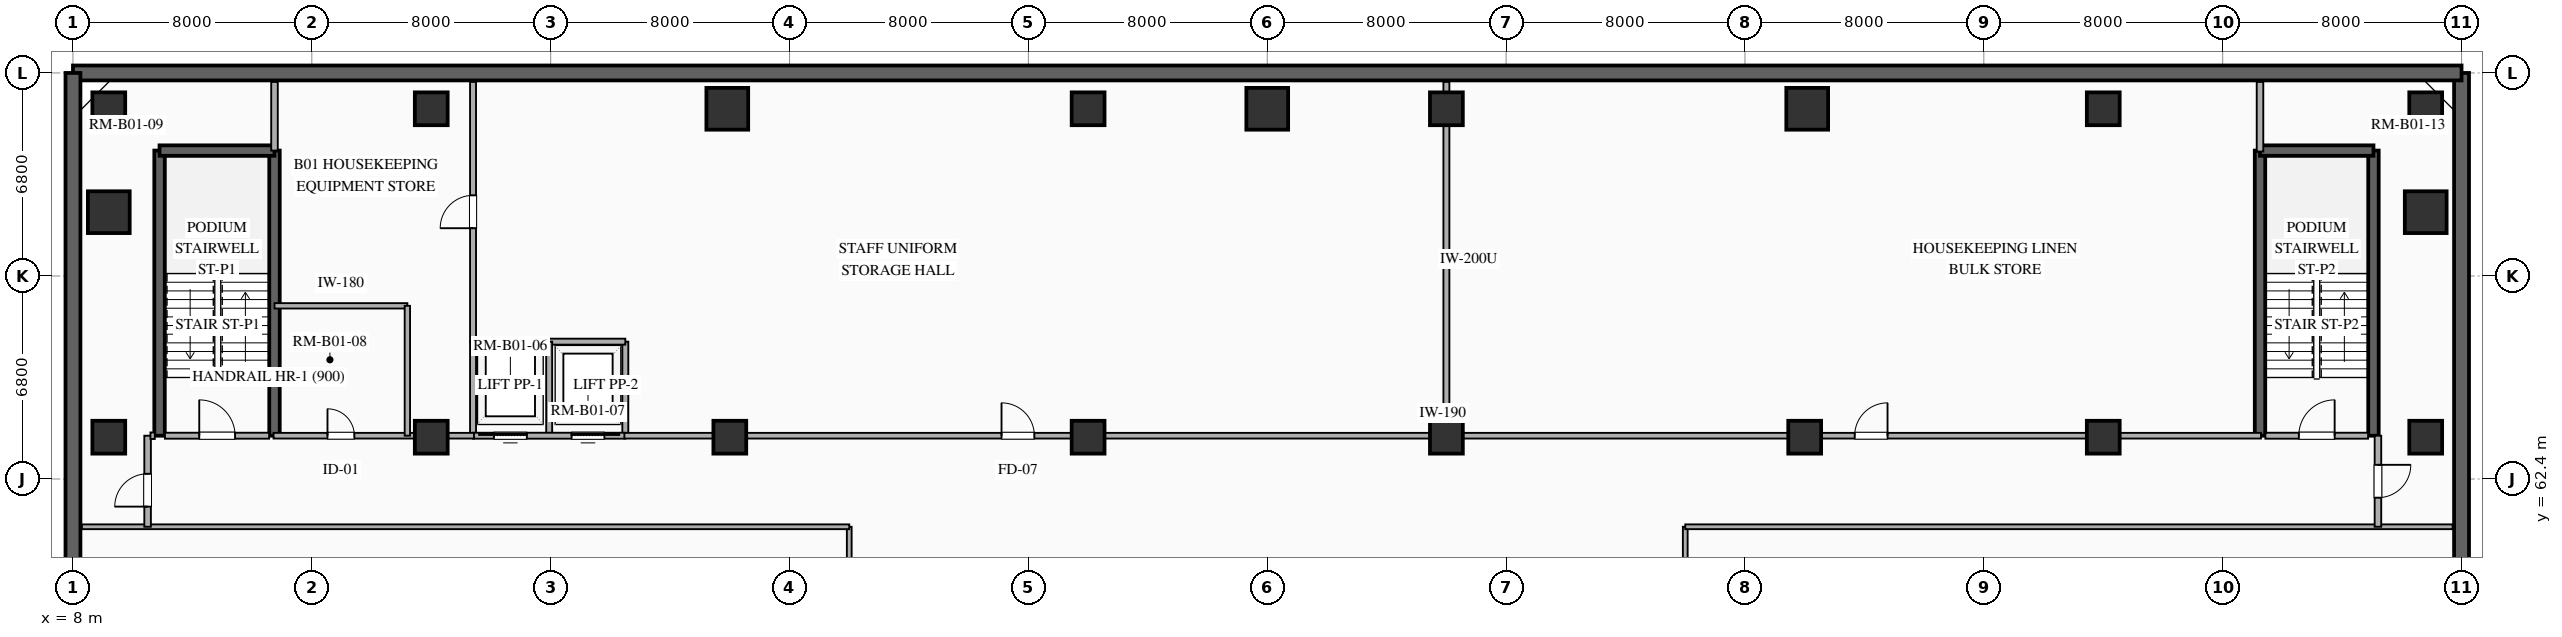
"""IFC4 building model, lengths in metres.
Left out: names, types, materials, properties, quantities, classifications, styles, units other than length and angle.
Written with IfcOpenShell. Run it as: python <this file> out.ifc"""

import sys

from ifc_helpers import new_model, si_unit, direction, frame, frame_2d, origin, origin_2d, place, context, subcontext, project, spatial, rectangle, extrude, element, fill, save


model = new_model("IFC4")
c1 = context("Model", 3, precision=1e-05, world=origin(), true_north=direction((0.0, 1.0)))
c2 = subcontext(c1, "Body", "Model", "MODEL_VIEW")
j1 = project(units=[si_unit("LENGTHUNIT", "METRE"), si_unit("PLANEANGLEUNIT", "RADIAN")], contexts=[c1])
p1 = place(None, origin())
s1 = spatial("IfcSite", under=j1, at=p1, CompositionType="ELEMENT")
p2 = place(p1, origin())
s2 = spatial("IfcBuilding", under=s1, at=p2, CompositionType="ELEMENT")
p3 = place(p2, frame((0.0, 0.0, -4.5)))
s3 = spatial("IfcBuildingStorey", under=s2, at=p3, CompositionType="ELEMENT", Elevation=-4.5)
p4 = place(p3, frame((88.0, 8.0, 0.0), z_axis=(0.0, 0.0, 1.0), x_axis=(0.0, 1.0, 0.0)))
e1 = element("IfcWall", 1, at=p4, inside=s3, PredefinedType="SOLIDWALL", context=c2, shape_type="SweptSolid", body=[
    extrude(rectangle(XDim=68.0, YDim=0.5, at=frame_2d((34.0, 0.0))), origin(), (0.0, 0.0, 1.0), 4.22),
])
p5 = place(p3, frame((88.0, 76.0, 0.0), z_axis=(0.0, 0.0, 1.0), x_axis=(-1.0, 0.0, 0.0)))
e2 = element("IfcWall", 2, at=p5, inside=s3, PredefinedType="SOLIDWALL", context=c2, shape_type="SweptSolid", body=[
    extrude(rectangle(XDim=80.0, YDim=0.5, at=frame_2d((40.0, 0.0))), origin(), (0.0, 0.0, 1.0), 4.22),
])
p6 = place(p3, frame((8.0, 76.0, 0.0), z_axis=(0.0, 0.0, 1.0), x_axis=(0.0, -1.0, 0.0)))
e3 = element("IfcWall", 3, at=p6, inside=s3, PredefinedType="SOLIDWALL", context=c2, shape_type="SweptSolid", body=[
    extrude(rectangle(XDim=68.0, YDim=0.5, at=frame_2d((34.0, 0.0))), origin(), (0.0, 0.0, 1.0), 4.22),
])
for number, where, z_axis, x_axis in (
    (4, (9.2, 74.8, 0.0), (0.0, 0.0, 1.0), (1.0, 0.0, 0.0)),
    (5, (9.2, 63.8, 0.0), (0.0, 0.0, 1.0), (1.0, 0.0, 0.0)),
    (6, (20.0, 74.8, 0.0), (0.0, 0.0, 1.0), (1.0, 0.0, 0.0)),
    (7, (20.0, 63.8, 0.0), (0.0, 0.0, 1.0), (1.0, 0.0, 0.0)),
    (8, (30.0, 63.8, 0.0), (0.0, 0.0, 1.0), (1.0, 0.0, 0.0)),
    (9, (42.0, 74.8, 0.0), (0.0, 0.0, 1.0), (1.0, 0.0, 0.0)),
    (10, (42.0, 63.8, 0.0), (0.0, 0.0, 1.0), (1.0, 0.0, 0.0)),
    (11, (54.0, 74.8, 0.0), (0.0, 0.0, 1.0), (1.0, 0.0, 0.0)),
    (12, (54.0, 63.8, 0.0), (0.0, 0.0, 1.0), (1.0, 0.0, 0.0)),
    (13, (66.0, 63.8, 0.0), (0.0, 0.0, 1.0), (1.0, 0.0, 0.0)),
    (14, (76.0, 74.8, 0.0), (0.0, 0.0, 1.0), (1.0, 0.0, 0.0)),
    (15, (76.0, 63.8, 0.0), (0.0, 0.0, 1.0), (1.0, 0.0, 0.0)),
    (16, (86.8, 74.8, 0.0), (0.0, 0.0, 1.0), (1.0, 0.0, 0.0)),
    (17, (86.8, 63.8, 0.0), (0.0, 0.0, 1.0), (1.0, 0.0, 0.0)),
):
    element("IfcColumn", number, at=place(p3, frame(where, z_axis=z_axis, x_axis=x_axis)), inside=s3, PredefinedType="COLUMN", context=c2, shape_type="SweptSolid", body=[
        extrude(rectangle(XDim=1.1, YDim=1.1, at=origin_2d()), origin(), (0.0, 0.0, 1.0), 4.22),
    ])
for number, where, z_axis, x_axis in (
    (18, (86.8, 71.337, 0.0), (0.0, 0.0, 1.0), (1.0, 0.0, 0.0)),
    (19, (66.084, 74.8, 0.0), (0.0, 0.0, 1.0), (1.0, 0.0, 0.0)),
    (20, (48.0, 74.8, 0.0), (0.0, 0.0, 1.0), (1.0, 0.0, 0.0)),
    (21, (29.916, 74.8, 0.0), (0.0, 0.0, 1.0), (1.0, 0.0, 0.0)),
    (22, (9.2, 71.337, 0.0), (0.0, 0.0, 1.0), (1.0, 0.0, 0.0)),
):
    element("IfcColumn", number, at=place(p3, frame(where, z_axis=z_axis, x_axis=x_axis)), inside=s3, PredefinedType="COLUMN", context=c2, shape_type="SweptSolid", body=[
        extrude(rectangle(XDim=1.4, YDim=1.4, at=origin_2d()), origin(), (0.0, 0.0, 1.0), 4.22),
    ])
for number, where, z_axis, x_axis in (
    (23, (10.9, 63.85, 0.0), (0.0, 0.0, 1.0), (0.0, 1.0, 0.0)),
    (24, (14.75, 63.85, 0.0), (0.0, 0.0, 1.0), (0.0, 1.0, 0.0)),
):
    element("IfcWall", number, at=place(p3, frame(where, z_axis=z_axis, x_axis=x_axis)), inside=s3, PredefinedType="SHEAR", context=c2, shape_type="SweptSolid", body=[
        extrude(rectangle(XDim=9.55, YDim=0.35, at=frame_2d((4.775, 0.0))), origin(), (0.0, 0.0, 1.0), 4.22),
    ])
p7 = place(p3, frame((10.9, 73.4, 0.0), z_axis=(0.0, 0.0, 1.0), x_axis=(1.0, 0.0, 0.0)))
e25 = element("IfcWall", 25, at=p7, inside=s3, PredefinedType="SHEAR", context=c2, shape_type="SweptSolid", body=[
    extrude(rectangle(XDim=3.85, YDim=0.35, at=frame_2d((1.925, 0.0))), origin(), (0.0, 0.0, 1.0), 4.22),
])
for number, where, z_axis, x_axis in (
    (26, (81.25, 63.85, 0.0), (0.0, 0.0, 1.0), (0.0, 1.0, 0.0)),
    (27, (85.05, 63.85, 0.0), (0.0, 0.0, 1.0), (0.0, 1.0, 0.0)),
):
    element("IfcWall", number, at=place(p3, frame(where, z_axis=z_axis, x_axis=x_axis)), inside=s3, PredefinedType="SHEAR", context=c2, shape_type="SweptSolid", body=[
        extrude(rectangle(XDim=9.55, YDim=0.35, at=frame_2d((4.775, 0.0))), origin(), (0.0, 0.0, 1.0), 4.22),
    ])
p8 = place(p3, frame((81.25, 73.4, 0.0), z_axis=(0.0, 0.0, 1.0), x_axis=(1.0, 0.0, 0.0)))
e28 = element("IfcWall", 28, at=p8, inside=s3, PredefinedType="SHEAR", context=c2, shape_type="SweptSolid", body=[
    extrude(rectangle(XDim=3.8, YDim=0.35, at=frame_2d((1.9, 0.0))), origin(), (0.0, 0.0, 1.0), 4.22),
])
p9 = place(p3, frame((11.08, 63.85, 0.0), z_axis=(0.0, 0.0, 1.0), x_axis=(1.0, 0.0, 0.0)))
e29 = element("IfcWall", 29, at=p9, inside=s3, PredefinedType="SOLIDWALL", context=c2, shape_type="SweptSolid", body=[
    extrude(rectangle(XDim=3.49, YDim=0.2, at=frame_2d((1.745, 0.0))), origin(), (0.0, 0.0, 1.0), 3.42),
])
p10 = place(p9, frame((1.15, 0.0, 0.0)))
e30 = element("IfcOpeningElement", 30, at=p10, cuts=e29, PredefinedType="OPENING", context=c2, shape_type="SweptSolid", body=[
    extrude(rectangle(XDim=1.2, YDim=2.15, at=frame_2d((0.6, 1.075))), frame((0.0, 0.11, 0.0), z_axis=(0.0, -1.0, 0.0), x_axis=(1.0, 0.0, 0.0)), (0.0, 0.0, 1.0), 0.22),
])
p11 = place(p3, frame((81.43, 63.85, 0.0), z_axis=(0.0, 0.0, 1.0), x_axis=(1.0, 0.0, 0.0)))
e31 = element("IfcWall", 31, at=p11, inside=s3, PredefinedType="SOLIDWALL", context=c2, shape_type="SweptSolid", body=[
    extrude(rectangle(XDim=3.44, YDim=0.2, at=frame_2d((1.72, 0.0))), origin(), (0.0, 0.0, 1.0), 3.42),
])
p12 = place(p11, frame((1.12, 0.0, 0.0)))
e32 = element("IfcOpeningElement", 32, at=p12, cuts=e31, PredefinedType="OPENING", context=c2, shape_type="SweptSolid", body=[
    extrude(rectangle(XDim=1.2, YDim=2.15, at=frame_2d((0.6, 1.075))), frame((0.0, 0.11, 0.0), z_axis=(0.0, -1.0, 0.0), x_axis=(1.0, 0.0, 0.0)), (0.0, 0.0, 1.0), 0.22),
])
for number, where, z_axis, x_axis in (
    (33, (21.4, 63.85, 0.0), (0.0, 0.0, 1.0), (0.0, 1.0, 0.0)),
    (34, (26.5, 63.85, 0.0), (0.0, 0.0, 1.0), (0.0, 1.0, 0.0)),
):
    element("IfcWall", number, at=place(p3, frame(where, z_axis=z_axis, x_axis=x_axis)), inside=s3, PredefinedType="SOLIDWALL", context=c2, shape_type="SweptSolid", body=[
        extrude(rectangle(XDim=3.15, YDim=0.2, at=frame_2d((1.575, 0.0))), origin(), (0.0, 0.0, 1.0), 3.42),
    ])
p13 = place(p3, frame((21.4, 67.0, 0.0), z_axis=(0.0, 0.0, 1.0), x_axis=(1.0, 0.0, 0.0)))
e35 = element("IfcWall", 35, at=p13, inside=s3, PredefinedType="SOLIDWALL", context=c2, shape_type="SweptSolid", body=[
    extrude(rectangle(XDim=5.1, YDim=0.2, at=frame_2d((2.55, 0.0))), origin(), (0.0, 0.0, 1.0), 3.42),
])
p14 = place(p3, frame((23.95, 63.85, 0.0), z_axis=(0.0, 0.0, 1.0), x_axis=(0.0, 1.0, 0.0)))
e36 = element("IfcWall", 36, at=p14, inside=s3, PredefinedType="SOLIDWALL", context=c2, shape_type="SweptSolid", body=[
    extrude(rectangle(XDim=3.15, YDim=0.2, at=frame_2d((1.575, 0.0))), origin(), (0.0, 0.0, 1.0), 3.42),
])
p15 = place(p3, frame((21.4, 63.85, 0.0), z_axis=(0.0, 0.0, 1.0), x_axis=(1.0, 0.0, 0.0)))
e37 = element("IfcWall", 37, at=p15, inside=s3, PredefinedType="SOLIDWALL", context=c2, shape_type="SweptSolid", body=[
    extrude(rectangle(XDim=5.1, YDim=0.2, at=frame_2d((2.55, 0.0))), origin(), (0.0, 0.0, 1.0), 3.42),
])
p16 = place(p15, frame((0.7, 0.0, 0.0)))
e38 = element("IfcOpeningElement", 38, at=p16, cuts=e37, PredefinedType="OPENING", context=c2, shape_type="SweptSolid", body=[
    extrude(rectangle(XDim=1.1, YDim=2.2, at=frame_2d((0.55, 1.1))), frame((0.0, 0.11, 0.0), z_axis=(0.0, -1.0, 0.0), x_axis=(1.0, 0.0, 0.0)), (0.0, 0.0, 1.0), 0.22),
])
p17 = place(p15, frame((3.3, 0.0, 0.0)))
e39 = element("IfcOpeningElement", 39, at=p17, cuts=e37, PredefinedType="OPENING", context=c2, shape_type="SweptSolid", body=[
    extrude(rectangle(XDim=1.1, YDim=2.2, at=frame_2d((0.55, 1.1))), frame((0.0, 0.11, 0.0), z_axis=(0.0, -1.0, 0.0), x_axis=(1.0, 0.0, 0.0)), (0.0, 0.0, 1.0), 0.22),
])
p18 = place(p3, frame((34.0, 33.0, 0.0), z_axis=(0.0, 0.0, 1.0), x_axis=(0.0, 1.0, 0.0)))
e40 = element("IfcWall", 40, at=p18, inside=s3, PredefinedType="PLUMBINGWALL", context=c2, shape_type="SweptSolid", body=[
    extrude(rectangle(XDim=27.8, YDim=0.16, at=frame_2d((13.9, 0.0))), origin(), (0.0, 0.0, 1.0), 3.42),
])
p19 = place(p18, frame((13.35, 0.0, 0.0)))
e41 = element("IfcOpeningElement", 41, at=p19, cuts=e40, PredefinedType="OPENING", context=c2, shape_type="SweptSolid", body=[
    extrude(rectangle(XDim=1.1, YDim=2.2, at=frame_2d((0.55, 1.1))), frame((0.0, 0.09, 0.0), z_axis=(0.0, -1.0, 0.0), x_axis=(1.0, 0.0, 0.0)), (0.0, 0.0, 1.0), 0.18),
])
p20 = place(p3, frame((62.0, 60.8, 0.0), z_axis=(0.0, 0.0, 1.0), x_axis=(0.0, -1.0, 0.0)))
e42 = element("IfcWall", 42, at=p20, inside=s3, PredefinedType="PLUMBINGWALL", context=c2, shape_type="SweptSolid", body=[
    extrude(rectangle(XDim=27.8, YDim=0.16, at=frame_2d((13.9, 0.0))), origin(), (0.0, 0.0, 1.0), 3.42),
])
p21 = place(p20, frame((13.35, 0.0, 0.0)))
e43 = element("IfcOpeningElement", 43, at=p21, cuts=e42, PredefinedType="OPENING", context=c2, shape_type="SweptSolid", body=[
    extrude(rectangle(XDim=1.1, YDim=2.2, at=frame_2d((0.55, 1.1))), frame((0.0, 0.09, 0.0), z_axis=(0.0, -1.0, 0.0), x_axis=(1.0, 0.0, 0.0)), (0.0, 0.0, 1.0), 0.18),
])
p22 = place(p3, frame((26.468, 63.85, 0.0), z_axis=(0.0, 0.0, 1.0), x_axis=(1.0, 0.0, 0.0)))
e44 = element("IfcWall", 44, at=p22, inside=s3, PredefinedType="PARTITIONING", context=c2, shape_type="SweptSolid", body=[
    extrude(rectangle(XDim=54.814, YDim=0.19, at=frame_2d((27.407, 0.0))), origin(), (0.0, 0.0, 1.0), 3.42),
])
p23 = place(p22, frame((12.632, 0.0, 0.0)))
e45 = element("IfcOpeningElement", 45, at=p23, cuts=e44, PredefinedType="OPENING", context=c2, shape_type="SweptSolid", body=[
    extrude(rectangle(XDim=1.1, YDim=2.2, at=frame_2d((0.55, 1.1))), frame((0.0, 0.105, 0.0), z_axis=(0.0, -1.0, 0.0), x_axis=(1.0, 0.0, 0.0)), (0.0, 0.0, 1.0), 0.21),
])
p24 = place(p22, frame((41.207, 0.0, 0.0)))
e46 = element("IfcOpeningElement", 46, at=p24, cuts=e44, PredefinedType="OPENING", context=c2, shape_type="SweptSolid", body=[
    extrude(rectangle(XDim=1.1, YDim=2.2, at=frame_2d((0.55, 1.1))), frame((0.0, 0.105, 0.0), z_axis=(0.0, -1.0, 0.0), x_axis=(1.0, 0.0, 0.0)), (0.0, 0.0, 1.0), 0.21),
])
for number, where, z_axis, x_axis in (
    (47, (34.0, 60.8, 0.0), (0.0, 0.0, 1.0), (-1.0, 0.0, 0.0)),
    (48, (87.7, 60.8, 0.0), (0.0, 0.0, 1.0), (-1.0, 0.0, 0.0)),
):
    element("IfcWall", number, at=place(p3, frame(where, z_axis=z_axis, x_axis=x_axis)), inside=s3, PredefinedType="PLUMBINGWALL", context=c2, shape_type="SweptSolid", body=[
        extrude(rectangle(XDim=25.7, YDim=0.16, at=frame_2d((12.85, 0.0))), origin(), (0.0, 0.0, 1.0), 3.42),
    ])
p25 = place(p3, frame((54.0, 75.7, 0.0), z_axis=(0.0, 0.0, 1.0), x_axis=(0.0, -1.0, 0.0)))
e49 = element("IfcWall", 49, at=p25, inside=s3, PredefinedType="PARTITIONING", context=c2, shape_type="SweptSolid", body=[
    extrude(rectangle(XDim=11.85, YDim=0.2, at=frame_2d((5.925, 0.0))), origin(), (0.0, 0.0, 1.0), 3.42),
])
p26 = place(p3, frame((21.4, 67.0, 0.0), z_axis=(0.0, 0.0, 1.0), x_axis=(0.0, 1.0, 0.0)))
e50 = element("IfcWall", 50, at=p26, inside=s3, PredefinedType="PARTITIONING", context=c2, shape_type="SweptSolid", body=[
    extrude(rectangle(XDim=8.7, YDim=0.2, at=frame_2d((4.35, 0.0))), origin(), (0.0, 0.0, 1.0), 3.42),
])
p27 = place(p26, frame((3.8, 0.0, 0.0)))
e51 = element("IfcOpeningElement", 51, at=p27, cuts=e50, PredefinedType="OPENING", context=c2, shape_type="SweptSolid", body=[
    extrude(rectangle(XDim=1.1, YDim=2.2, at=frame_2d((0.55, 1.1))), frame((0.0, 0.11, 0.0), z_axis=(0.0, -1.0, 0.0), x_axis=(1.0, 0.0, 0.0)), (0.0, 0.0, 1.0), 0.22),
])
p28 = place(p3, frame((14.718, 63.85, 0.0), z_axis=(0.0, 0.0, 1.0), x_axis=(1.0, 0.0, 0.0)))
e52 = element("IfcWall", 52, at=p28, inside=s3, PredefinedType="PARTITIONING", context=c2, shape_type="SweptSolid", body=[
    extrude(rectangle(XDim=6.714, YDim=0.19, at=frame_2d((3.357, 0.0))), origin(), (0.0, 0.0, 1.0), 3.42),
])
p29 = place(p28, frame((1.807, 0.0, 0.0)))
e53 = element("IfcOpeningElement", 53, at=p29, cuts=e52, PredefinedType="OPENING", context=c2, shape_type="SweptSolid", body=[
    extrude(rectangle(XDim=0.9, YDim=2.1, at=frame_2d((0.45, 1.05))), frame((0.0, 0.105, 0.0), z_axis=(0.0, -1.0, 0.0), x_axis=(1.0, 0.0, 0.0)), (0.0, 0.0, 1.0), 0.21),
])
p30 = place(p3, frame((14.75, 68.2, 0.0), z_axis=(0.0, 0.0, 1.0), x_axis=(1.0, 0.0, 0.0)))
e54 = element("IfcWall", 54, at=p30, inside=s3, PredefinedType="PLUMBINGWALL", context=c2, shape_type="SweptSolid", body=[
    extrude(rectangle(XDim=4.45, YDim=0.18, at=frame_2d((2.225, 0.0))), origin(), (0.0, 0.0, 1.0), 3.42),
])
p31 = place(p3, frame((19.2, 68.2, 0.0), z_axis=(0.0, 0.0, 1.0), x_axis=(0.0, -1.0, 0.0)))
e55 = element("IfcWall", 55, at=p31, inside=s3, PredefinedType="PLUMBINGWALL", context=c2, shape_type="SweptSolid", body=[
    extrude(rectangle(XDim=4.35, YDim=0.18, at=frame_2d((2.175, 0.0))), origin(), (0.0, 0.0, 1.0), 3.42),
])
p32 = place(p3, frame((10.5, 60.8, 0.0), z_axis=(0.0, 0.0, 1.0), x_axis=(0.0, 1.0, 0.0)))
e56 = element("IfcWall", 56, at=p32, inside=s3, PredefinedType="SOLIDWALL", context=c2, shape_type="SweptSolid", body=[
    extrude(rectangle(XDim=3.05, YDim=0.22, at=frame_2d((1.525, 0.0))), origin(), (0.0, 0.0, 1.0), 3.42),
])
p33 = place(p32, frame((0.675, 0.0, 0.0)))
e57 = element("IfcOpeningElement", 57, at=p33, cuts=e56, PredefinedType="OPENING", context=c2, shape_type="SweptSolid", body=[
    extrude(rectangle(XDim=1.1, YDim=2.2, at=frame_2d((0.55, 1.1))), frame((0.0, 0.12, 0.0), z_axis=(0.0, -1.0, 0.0), x_axis=(1.0, 0.0, 0.0)), (0.0, 0.0, 1.0), 0.24),
])
p34 = place(p3, frame((85.2, 63.85, 0.0), z_axis=(0.0, 0.0, 1.0), x_axis=(0.0, -1.0, 0.0)))
e58 = element("IfcWall", 58, at=p34, inside=s3, PredefinedType="SOLIDWALL", context=c2, shape_type="SweptSolid", body=[
    extrude(rectangle(XDim=3.05, YDim=0.22, at=frame_2d((1.525, 0.0))), origin(), (0.0, 0.0, 1.0), 3.42),
])
p35 = place(p34, frame((0.975, 0.0, 0.0)))
e59 = element("IfcOpeningElement", 59, at=p35, cuts=e58, PredefinedType="OPENING", context=c2, shape_type="SweptSolid", body=[
    extrude(rectangle(XDim=1.1, YDim=2.2, at=frame_2d((0.55, 1.1))), frame((0.0, 0.12, 0.0), z_axis=(0.0, -1.0, 0.0), x_axis=(1.0, 0.0, 0.0)), (0.0, 0.0, 1.0), 0.24),
])
p36 = place(p3, frame((81.25, 75.7, 0.0), z_axis=(0.0, 0.0, 1.0), x_axis=(0.0, -1.0, 0.0)))
e60 = element("IfcWall", 60, at=p36, inside=s3, PredefinedType="SOLIDWALL", context=c2, shape_type="SweptSolid", body=[
    extrude(rectangle(XDim=2.332, YDim=0.22, at=frame_2d((1.166, 0.0))), origin(), (0.0, 0.0, 1.0), 3.42),
])
p37 = place(p3, frame((14.75, 75.7, 0.0), z_axis=(0.0, 0.0, 1.0), x_axis=(0.0, -1.0, 0.0)))
e61 = element("IfcWall", 61, at=p37, inside=s3, PredefinedType="SOLIDWALL", context=c2, shape_type="SweptSolid", body=[
    extrude(rectangle(XDim=2.3, YDim=0.22, at=frame_2d((1.15, 0.0))), origin(), (0.0, 0.0, 1.0), 3.42),
])
p38 = place(p3, frame((10.596, 63.85, 0.0), z_axis=(0.0, 0.0, 1.0), x_axis=(1.0, 0.0, 0.0)))
e62 = element("IfcWall", 62, at=p38, inside=s3, PredefinedType="SOLIDWALL", context=c2, shape_type="SweptSolid", body=[
    extrude(rectangle(XDim=0.144, YDim=0.22, at=frame_2d((0.072, 0.0))), origin(), (0.0, 0.0, 1.0), 3.42),
])
p39 = place(p10, origin())
e63 = element("IfcDoor", 63, at=p39, inside=s3, OperationType="SINGLE_SWING_LEFT", PredefinedType="DOOR", context=c2, shape_type="SweptSolid", body=[
    extrude(rectangle(XDim=1.2, YDim=2.15, at=frame_2d((0.6, 1.075))), frame((0.0, 0.025, 0.0), z_axis=(0.0, -1.0, 0.0), x_axis=(1.0, 0.0, 0.0)), (0.0, 0.0, 1.0), 0.05),
])
fill(e30, e63)
p40 = place(p12, origin())
e64 = element("IfcDoor", 64, at=p40, inside=s3, OperationType="SINGLE_SWING_RIGHT", PredefinedType="DOOR", context=c2, shape_type="SweptSolid", body=[
    extrude(rectangle(XDim=1.2, YDim=2.15, at=frame_2d((0.6, 1.075))), frame((0.0, 0.025, 0.0), z_axis=(0.0, -1.0, 0.0), x_axis=(1.0, 0.0, 0.0)), (0.0, 0.0, 1.0), 0.05),
])
fill(e32, e64)
p41 = place(p16, origin())
e65 = element("IfcDoor", 65, at=p41, inside=s3, OperationType="SLIDING_TO_LEFT", PredefinedType="DOOR", context=c2, shape_type="SweptSolid", body=[
    extrude(rectangle(XDim=1.1, YDim=2.2, at=frame_2d((0.55, 1.1))), frame((0.0, 0.025, 0.0), z_axis=(0.0, -1.0, 0.0), x_axis=(1.0, 0.0, 0.0)), (0.0, 0.0, 1.0), 0.05),
])
fill(e38, e65)
p42 = place(p17, origin())
e66 = element("IfcDoor", 66, at=p42, inside=s3, OperationType="SLIDING_TO_RIGHT", PredefinedType="DOOR", context=c2, shape_type="SweptSolid", body=[
    extrude(rectangle(XDim=1.1, YDim=2.2, at=frame_2d((0.55, 1.1))), frame((0.0, 0.025, 0.0), z_axis=(0.0, -1.0, 0.0), x_axis=(1.0, 0.0, 0.0)), (0.0, 0.0, 1.0), 0.05),
])
fill(e39, e66)
p43 = place(p23, origin())
e67 = element("IfcDoor", 67, at=p43, inside=s3, OperationType="SINGLE_SWING_LEFT", PredefinedType="DOOR", context=c2, shape_type="SweptSolid", body=[
    extrude(rectangle(XDim=1.1, YDim=2.2, at=frame_2d((0.55, 1.1))), frame((0.0, 0.025, 0.0), z_axis=(0.0, -1.0, 0.0), x_axis=(1.0, 0.0, 0.0)), (0.0, 0.0, 1.0), 0.05),
])
fill(e45, e67)
p44 = place(p24, origin())
e68 = element("IfcDoor", 68, at=p44, inside=s3, OperationType="SINGLE_SWING_RIGHT", PredefinedType="DOOR", context=c2, shape_type="SweptSolid", body=[
    extrude(rectangle(XDim=1.1, YDim=2.2, at=frame_2d((0.55, 1.1))), frame((0.0, 0.025, 0.0), z_axis=(0.0, -1.0, 0.0), x_axis=(1.0, 0.0, 0.0)), (0.0, 0.0, 1.0), 0.05),
])
fill(e46, e68)
p45 = place(p27, origin())
e69 = element("IfcDoor", 69, at=p45, inside=s3, OperationType="SINGLE_SWING_LEFT", PredefinedType="DOOR", context=c2, shape_type="SweptSolid", body=[
    extrude(rectangle(XDim=1.1, YDim=2.2, at=frame_2d((0.55, 1.1))), frame((0.0, 0.025, 0.0), z_axis=(0.0, -1.0, 0.0), x_axis=(1.0, 0.0, 0.0)), (0.0, 0.0, 1.0), 0.05),
])
fill(e51, e69)
p46 = place(p29, origin())
e70 = element("IfcDoor", 70, at=p46, inside=s3, OperationType="SINGLE_SWING_LEFT", PredefinedType="DOOR", context=c2, shape_type="SweptSolid", body=[
    extrude(rectangle(XDim=0.9, YDim=2.1, at=frame_2d((0.45, 1.05))), frame((0.0, 0.025, 0.0), z_axis=(0.0, -1.0, 0.0), x_axis=(1.0, 0.0, 0.0)), (0.0, 0.0, 1.0), 0.05),
])
fill(e53, e70)
p47 = place(p33, origin())
e71 = element("IfcDoor", 71, at=p47, inside=s3, OperationType="SINGLE_SWING_LEFT", PredefinedType="DOOR", context=c2, shape_type="SweptSolid", body=[
    extrude(rectangle(XDim=1.1, YDim=2.2, at=frame_2d((0.55, 1.1))), frame((0.0, 0.025, 0.0), z_axis=(0.0, -1.0, 0.0), x_axis=(1.0, 0.0, 0.0)), (0.0, 0.0, 1.0), 0.05),
])
fill(e57, e71)
p48 = place(p35, origin())
e72 = element("IfcDoor", 72, at=p48, inside=s3, OperationType="SINGLE_SWING_LEFT", PredefinedType="DOOR", context=c2, shape_type="SweptSolid", body=[
    extrude(rectangle(XDim=1.1, YDim=2.2, at=frame_2d((0.55, 1.1))), frame((0.0, 0.025, 0.0), z_axis=(0.0, -1.0, 0.0), x_axis=(1.0, 0.0, 0.0)), (0.0, 0.0, 1.0), 0.05),
])
fill(e59, e72)
save(model, sys.argv[1])
